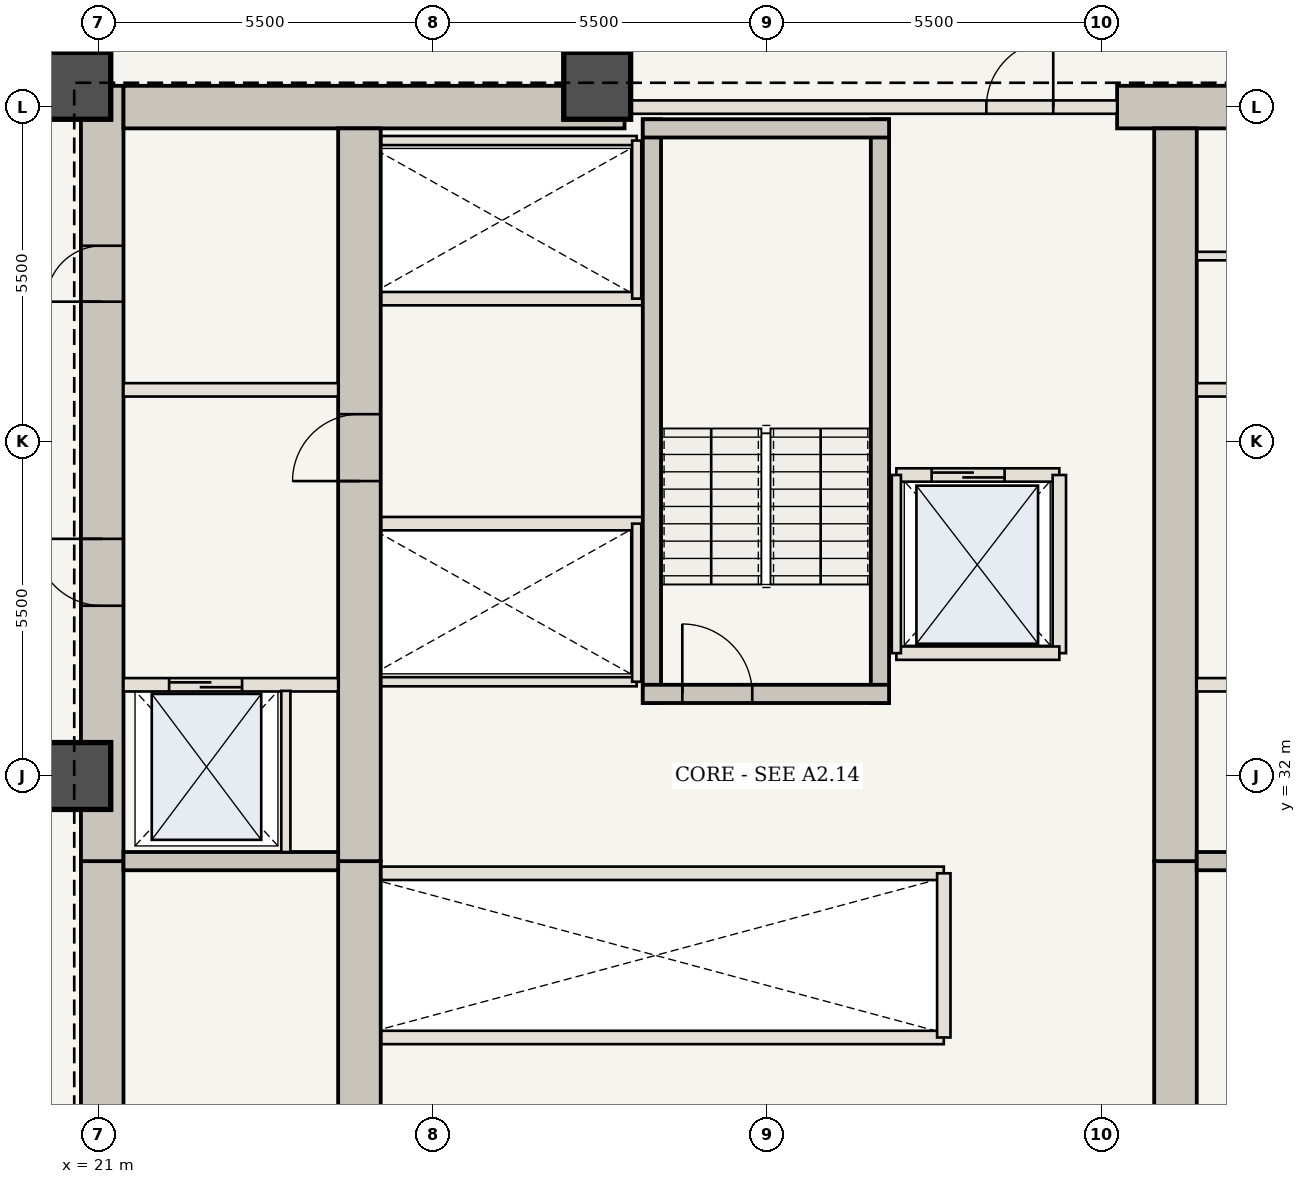
"""IFC4 building model, lengths in metres.
Left out: names, types, materials, properties, quantities, classifications, styles, units other than length and angle.
Written with IfcOpenShell. Run it as: python <this file> out.ifc"""

import sys

from ifc_helpers import new_model, si_unit, direction, frame, frame_2d, origin, origin_2d, place, context, subcontext, project, spatial, rectangle, extrude, element, fill, save


model = new_model("IFC4")
c1 = context("Model", 3, precision=1e-05, world=origin(), true_north=direction((0.0, 1.0)))
c2 = subcontext(c1, "Body", "Model", "MODEL_VIEW")
j1 = project(units=[si_unit("LENGTHUNIT", "METRE"), si_unit("PLANEANGLEUNIT", "RADIAN")], contexts=[c1])
p1 = place(None, origin())
s1 = spatial("IfcSite", under=j1, at=p1, CompositionType="ELEMENT")
p2 = place(p1, origin())
s2 = spatial("IfcBuilding", under=s1, at=p2, CompositionType="ELEMENT")
p3 = place(p2, frame((0.0, 0.0, 56.35)))
s3 = spatial("IfcBuildingStorey", under=s2, at=p3, CompositionType="ELEMENT", Elevation=56.35)
p4 = place(p3, frame((21.06, 20.6, 0.0), z_axis=(0.0, 0.0, 1.0), x_axis=(0.0, 1.0, 0.0)))
e1 = element("IfcWall", 1, at=p4, inside=s3, PredefinedType="SHEAR", context=c2, shape_type="SweptSolid", body=[
    extrude(rectangle(XDim=10.0, YDim=0.7, at=frame_2d((5.0, 0.0))), origin(), (0.0, 0.0, 1.0), 3.5),
])
p5 = place(p4, frame((1.15, 0.0, 0.0)))
e2 = element("IfcOpeningElement", 2, at=p5, cuts=e1, PredefinedType="OPENING", context=c2, shape_type="SweptSolid", body=[
    extrude(rectangle(XDim=1.15, YDim=2.15, at=frame_2d((0.575, 1.075))), frame((0.0, 0.36, 0.0), z_axis=(0.0, -1.0, 0.0), x_axis=(1.0, 0.0, 0.0)), (0.0, 0.0, 1.0), 0.72),
])
p6 = place(p3, frame((21.06, 30.6, 0.0), z_axis=(0.0, 0.0, 1.0), x_axis=(0.0, 1.0, 0.0)))
e3 = element("IfcWall", 3, at=p6, inside=s3, PredefinedType="SHEAR", context=c2, shape_type="SweptSolid", body=[
    extrude(rectangle(XDim=12.75, YDim=0.7, at=frame_2d((6.375, 0.0))), origin(), (0.0, 0.0, 1.0), 3.5),
])
p7 = place(p6, frame((4.2, 0.0, 0.0)))
e4 = element("IfcOpeningElement", 4, at=p7, cuts=e3, PredefinedType="OPENING", context=c2, shape_type="SweptSolid", body=[
    extrude(rectangle(XDim=1.1, YDim=2.15, at=frame_2d((0.55, 1.075))), frame((0.0, 0.36, 0.0), z_axis=(0.0, -1.0, 0.0), x_axis=(1.0, 0.0, 0.0)), (0.0, 0.0, 1.0), 0.72),
])
p8 = place(p6, frame((9.2, 0.0, 0.0)))
e5 = element("IfcOpeningElement", 5, at=p8, cuts=e3, PredefinedType="OPENING", context=c2, shape_type="SweptSolid", body=[
    extrude(rectangle(XDim=0.92, YDim=2.1, at=frame_2d((0.46, 1.05))), frame((0.0, 0.36, 0.0), z_axis=(0.0, -1.0, 0.0), x_axis=(1.0, 0.0, 0.0)), (0.0, 0.0, 1.0), 0.72),
])
p9 = place(p3, frame((21.41, 43.0, 0.0), z_axis=(0.0, 0.0, 1.0), x_axis=(1.0, 0.0, 0.0)))
e6 = element("IfcWall", 6, at=p9, inside=s3, PredefinedType="SHEAR", context=c2, shape_type="SweptSolid", body=[
    extrude(rectangle(XDim=8.24, YDim=0.7, at=frame_2d((4.12, 0.0))), origin(), (0.0, 0.0, 1.0), 3.5),
])
p10 = place(p3, frame((37.75, 43.0, 0.0), z_axis=(0.0, 0.0, 1.0), x_axis=(1.0, 0.0, 0.0)))
e7 = element("IfcWall", 7, at=p10, inside=s3, PredefinedType="SHEAR", context=c2, shape_type="SweptSolid", body=[
    extrude(rectangle(XDim=4.84, YDim=0.7, at=frame_2d((2.42, 0.0))), origin(), (0.0, 0.0, 1.0), 3.5),
])
p11 = place(p3, frame((25.29, 21.3, 0.0), z_axis=(0.0, 0.0, 1.0), x_axis=(0.0, 1.0, 0.0)))
e8 = element("IfcWall", 8, at=p11, inside=s3, PredefinedType="SHEAR", context=c2, shape_type="SweptSolid", body=[
    extrude(rectangle(XDim=9.3, YDim=0.7, at=frame_2d((4.65, 0.0))), origin(), (0.0, 0.0, 1.0), 3.5),
])
p12 = place(p3, frame((25.29, 30.6, 0.0), z_axis=(0.0, 0.0, 1.0), x_axis=(0.0, 1.0, 0.0)))
e9 = element("IfcWall", 9, at=p12, inside=s3, PredefinedType="SHEAR", context=c2, shape_type="SweptSolid", body=[
    extrude(rectangle(XDim=12.05, YDim=0.7, at=frame_2d((6.025, 0.0))), origin(), (0.0, 0.0, 1.0), 3.5),
])
p13 = place(p12, frame((6.25, 0.0, 0.0)))
e10 = element("IfcOpeningElement", 10, at=p13, cuts=e9, PredefinedType="OPENING", context=c2, shape_type="SweptSolid", body=[
    extrude(rectangle(XDim=1.1, YDim=2.15, at=frame_2d((0.55, 1.075))), frame((0.0, 0.36, 0.0), z_axis=(0.0, -1.0, 0.0), x_axis=(1.0, 0.0, 0.0)), (0.0, 0.0, 1.0), 0.72),
])
p14 = place(p3, frame((38.71, 21.3, 0.0), z_axis=(0.0, 0.0, 1.0), x_axis=(0.0, 1.0, 0.0)))
e11 = element("IfcWall", 11, at=p14, inside=s3, PredefinedType="SHEAR", context=c2, shape_type="SweptSolid", body=[
    extrude(rectangle(XDim=9.3, YDim=0.7, at=frame_2d((4.65, 0.0))), origin(), (0.0, 0.0, 1.0), 3.5),
])
p15 = place(p3, frame((38.71, 30.6, 0.0), z_axis=(0.0, 0.0, 1.0), x_axis=(0.0, 1.0, 0.0)))
e12 = element("IfcWall", 12, at=p15, inside=s3, PredefinedType="SHEAR", context=c2, shape_type="SweptSolid", body=[
    extrude(rectangle(XDim=12.05, YDim=0.7, at=frame_2d((6.025, 0.0))), origin(), (0.0, 0.0, 1.0), 3.5),
])
for number, where, z_axis, x_axis in (
    (13, (29.2, 43.35, 0.0), (0.0, 0.0, 1.0), (1.0, 0.0, 0.0)),
    (14, (20.65, 43.35, 0.0), (0.0, 0.0, 1.0), (1.0, 0.0, 0.0)),
    (15, (20.65, 32.0, 0.0), (0.0, 0.0, 1.0), (1.0, 0.0, 0.0)),
):
    element("IfcColumn", number, at=place(p3, frame(where, z_axis=z_axis, x_axis=x_axis)), inside=s3, PredefinedType="COLUMN", context=c2, shape_type="SweptSolid", body=[
        extrude(rectangle(XDim=1.1, YDim=1.1, at=origin_2d()), origin(), (0.0, 0.0, 1.0), 3.5),
    ])
for number, where, z_axis, x_axis in (
    (16, (21.41, 30.6, 0.0), (0.0, 0.0, 1.0), (1.0, 0.0, 0.0)),
    (17, (39.06, 30.6, 0.0), (0.0, 0.0, 1.0), (1.0, 0.0, 0.0)),
):
    element("IfcWall", number, at=place(p3, frame(where, z_axis=z_axis, x_axis=x_axis)), inside=s3, PredefinedType="SHEAR", context=c2, shape_type="SweptSolid", body=[
        extrude(rectangle(XDim=3.53, YDim=0.3, at=frame_2d((1.765, 0.0))), origin(), (0.0, 0.0, 1.0), 3.32),
    ])
p16 = place(p3, frame((21.41, 33.5, 0.0), z_axis=(0.0, 0.0, 1.0), x_axis=(1.0, 0.0, 0.0)))
e18 = element("IfcWall", 18, at=p16, inside=s3, PredefinedType="STANDARD", context=c2, shape_type="SweptSolid", body=[
    extrude(rectangle(XDim=3.53, YDim=0.22, at=frame_2d((1.765, 0.0))), origin(), (0.0, 0.0, 1.0), 3.32),
])
p17 = place(p16, frame((0.75, 0.0, 0.0)))
e19 = element("IfcOpeningElement", 19, at=p17, cuts=e18, PredefinedType="OPENING", context=c2, shape_type="SweptSolid", body=[
    extrude(rectangle(XDim=1.2, YDim=2.2, at=frame_2d((0.6, 1.1))), frame((0.0, 0.12, 0.0), z_axis=(0.0, -1.0, 0.0), x_axis=(1.0, 0.0, 0.0)), (0.0, 0.0, 1.0), 0.24),
])
p18 = place(p3, frame((24.08, 30.75, 0.0), z_axis=(0.0, 0.0, 1.0), x_axis=(0.0, 1.0, 0.0)))
e20 = element("IfcWall", 20, at=p18, inside=s3, PredefinedType="STANDARD", context=c2, shape_type="SweptSolid", body=[
    extrude(rectangle(XDim=2.65, YDim=0.15, at=frame_2d((1.325, 0.0))), origin(), (0.0, 0.0, 1.0), 3.32),
])
p19 = place(p3, frame((39.06, 33.5, 0.0), z_axis=(0.0, 0.0, 1.0), x_axis=(1.0, 0.0, 0.0)))
e21 = element("IfcWall", 21, at=p19, inside=s3, PredefinedType="STANDARD", context=c2, shape_type="SweptSolid", body=[
    extrude(rectangle(XDim=3.53, YDim=0.22, at=frame_2d((1.765, 0.0))), origin(), (0.0, 0.0, 1.0), 3.32),
])
p20 = place(p19, frame((1.55, 0.0, 0.0)))
e22 = element("IfcOpeningElement", 22, at=p20, cuts=e21, PredefinedType="OPENING", context=c2, shape_type="SweptSolid", body=[
    extrude(rectangle(XDim=1.2, YDim=2.2, at=frame_2d((0.6, 1.1))), frame((0.0, 0.12, 0.0), z_axis=(0.0, -1.0, 0.0), x_axis=(1.0, 0.0, 0.0)), (0.0, 0.0, 1.0), 0.24),
])
for number, where, z_axis, x_axis in (
    (23, (21.41, 38.35, 0.0), (0.0, 0.0, 1.0), (1.0, 0.0, 0.0)),
    (24, (39.06, 38.35, 0.0), (0.0, 0.0, 1.0), (1.0, 0.0, 0.0)),
):
    element("IfcWall", number, at=place(p3, frame(where, z_axis=z_axis, x_axis=x_axis)), inside=s3, PredefinedType="STANDARD", context=c2, shape_type="SweptSolid", body=[
        extrude(rectangle(XDim=3.53, YDim=0.22, at=frame_2d((1.765, 0.0))), origin(), (0.0, 0.0, 1.0), 3.32),
    ])
p21 = place(p3, frame((39.06, 40.55, 0.0), z_axis=(0.0, 0.0, 1.0), x_axis=(1.0, 0.0, 0.0)))
e25 = element("IfcWall", 25, at=p21, inside=s3, PredefinedType="STANDARD", context=c2, shape_type="SweptSolid", body=[
    extrude(rectangle(XDim=3.53, YDim=0.14, at=frame_2d((1.765, 0.0))), origin(), (0.0, 0.0, 1.0), 3.32),
])
for number, where, z_axis, x_axis in (
    (26, (25.65, 27.7, 0.0), (0.0, 0.0, 1.0), (1.0, 0.0, 0.0)),
    (27, (25.65, 30.4, 0.0), (0.0, 0.0, 1.0), (1.0, 0.0, 0.0)),
):
    element("IfcWall", number, at=place(p3, frame(where, z_axis=z_axis, x_axis=x_axis)), inside=s3, PredefinedType="STANDARD", context=c2, shape_type="SweptSolid", body=[
        extrude(rectangle(XDim=9.25, YDim=0.22, at=frame_2d((4.625, 0.0))), origin(), (0.0, 0.0, 1.0), 3.32),
    ])
p22 = place(p3, frame((34.9, 27.7, 0.0), z_axis=(0.0, 0.0, 1.0), x_axis=(0.0, 1.0, 0.0)))
e28 = element("IfcWall", 28, at=p22, inside=s3, PredefinedType="STANDARD", context=c2, shape_type="SweptSolid", body=[
    extrude(rectangle(XDim=2.7, YDim=0.22, at=frame_2d((1.35, 0.0))), origin(), (0.0, 0.0, 1.0), 3.32),
])
p23 = place(p3, frame((25.65, 36.15, 0.0), z_axis=(0.0, 0.0, 1.0), x_axis=(1.0, 0.0, 0.0)))
e29 = element("IfcWall", 29, at=p23, inside=s3, PredefinedType="STANDARD", context=c2, shape_type="SweptSolid", body=[
    extrude(rectangle(XDim=4.3, YDim=0.22, at=frame_2d((2.15, 0.0))), origin(), (0.0, 0.0, 1.0), 3.32),
])
p24 = place(p3, frame((25.65, 33.55, 0.0), z_axis=(0.0, 0.0, 1.0), x_axis=(1.0, 0.0, 0.0)))
e30 = element("IfcWall", 30, at=p24, inside=s3, PredefinedType="STANDARD", context=c2, shape_type="SweptSolid", body=[
    extrude(rectangle(XDim=4.2, YDim=0.15, at=frame_2d((2.1, 0.0))), origin(), (0.0, 0.0, 1.0), 3.32),
])
p25 = place(p3, frame((29.85, 33.55, 0.0), z_axis=(0.0, 0.0, 1.0), x_axis=(0.0, 1.0, 0.0)))
e31 = element("IfcWall", 31, at=p25, inside=s3, PredefinedType="STANDARD", context=c2, shape_type="SweptSolid", body=[
    extrude(rectangle(XDim=2.6, YDim=0.15, at=frame_2d((1.3, 0.0))), origin(), (0.0, 0.0, 1.0), 3.32),
])
p26 = place(p3, frame((25.65, 39.85, 0.0), z_axis=(0.0, 0.0, 1.0), x_axis=(1.0, 0.0, 0.0)))
e32 = element("IfcWall", 32, at=p26, inside=s3, PredefinedType="STANDARD", context=c2, shape_type="SweptSolid", body=[
    extrude(rectangle(XDim=4.3, YDim=0.22, at=frame_2d((2.15, 0.0))), origin(), (0.0, 0.0, 1.0), 3.32),
])
p27 = place(p3, frame((25.65, 42.45, 0.0), z_axis=(0.0, 0.0, 1.0), x_axis=(1.0, 0.0, 0.0)))
e33 = element("IfcWall", 33, at=p27, inside=s3, PredefinedType="STANDARD", context=c2, shape_type="SweptSolid", body=[
    extrude(rectangle(XDim=4.2, YDim=0.15, at=frame_2d((2.1, 0.0))), origin(), (0.0, 0.0, 1.0), 3.32),
])
p28 = place(p3, frame((29.85, 39.85, 0.0), z_axis=(0.0, 0.0, 1.0), x_axis=(0.0, 1.0, 0.0)))
e34 = element("IfcWall", 34, at=p28, inside=s3, PredefinedType="STANDARD", context=c2, shape_type="SweptSolid", body=[
    extrude(rectangle(XDim=2.6, YDim=0.15, at=frame_2d((1.3, 0.0))), origin(), (0.0, 0.0, 1.0), 3.32),
])
for number, where, z_axis, x_axis in (
    (35, (30.1, 33.2, 0.0), (0.0, 0.0, 1.0), (0.0, 1.0, 0.0)),
    (36, (33.85, 33.2, 0.0), (0.0, 0.0, 1.0), (0.0, 1.0, 0.0)),
):
    element("IfcWall", number, at=place(p3, frame(where, z_axis=z_axis, x_axis=x_axis)), inside=s3, PredefinedType="SHEAR", context=c2, shape_type="SweptSolid", body=[
        extrude(rectangle(XDim=9.6, YDim=0.3, at=frame_2d((4.8, 0.0))), origin(), (0.0, 0.0, 1.0), 3.32),
    ])
p29 = place(p3, frame((29.95, 33.35, 0.0), z_axis=(0.0, 0.0, 1.0), x_axis=(1.0, 0.0, 0.0)))
e37 = element("IfcWall", 37, at=p29, inside=s3, PredefinedType="SHEAR", context=c2, shape_type="SweptSolid", body=[
    extrude(rectangle(XDim=4.05, YDim=0.3, at=frame_2d((2.025, 0.0))), origin(), (0.0, 0.0, 1.0), 3.32),
])
p30 = place(p29, frame((0.65, 0.0, 0.0)))
e38 = element("IfcOpeningElement", 38, at=p30, cuts=e37, PredefinedType="OPENING", context=c2, shape_type="SweptSolid", body=[
    extrude(rectangle(XDim=1.15, YDim=2.15, at=frame_2d((0.575, 1.075))), frame((0.0, 0.16, 0.0), z_axis=(0.0, -1.0, 0.0), x_axis=(1.0, 0.0, 0.0)), (0.0, 0.0, 1.0), 0.32),
])
p31 = place(p3, frame((29.95, 42.65, 0.0), z_axis=(0.0, 0.0, 1.0), x_axis=(1.0, 0.0, 0.0)))
e39 = element("IfcWall", 39, at=p31, inside=s3, PredefinedType="SHEAR", context=c2, shape_type="SweptSolid", body=[
    extrude(rectangle(XDim=4.05, YDim=0.3, at=frame_2d((2.025, 0.0))), origin(), (0.0, 0.0, 1.0), 3.32),
])
p32 = place(p3, frame((29.65, 43.0, 0.0), z_axis=(0.0, 0.0, 1.0), x_axis=(1.0, 0.0, 0.0)))
e40 = element("IfcWall", 40, at=p32, inside=s3, PredefinedType="STANDARD", context=c2, shape_type="SweptSolid", body=[
    extrude(rectangle(XDim=8.1, YDim=0.22, at=frame_2d((4.05, 0.0))), origin(), (0.0, 0.0, 1.0), 3.32),
])
p33 = place(p32, frame((5.95, 0.0, 0.0)))
e41 = element("IfcOpeningElement", 41, at=p33, cuts=e40, PredefinedType="OPENING", context=c2, shape_type="SweptSolid", body=[
    extrude(rectangle(XDim=1.1, YDim=2.15, at=frame_2d((0.55, 1.075))), frame((0.0, 0.12, 0.0), z_axis=(0.0, -1.0, 0.0), x_axis=(1.0, 0.0, 0.0)), (0.0, 0.0, 1.0), 0.24),
])
p34 = place(p3, frame((34.12, 36.95, 0.0), z_axis=(0.0, 0.0, 1.0), x_axis=(1.0, 0.0, 0.0)))
e42 = element("IfcWall", 42, at=p34, inside=s3, PredefinedType="STANDARD", context=c2, shape_type="SweptSolid", body=[
    extrude(rectangle(XDim=2.68, YDim=0.22, at=frame_2d((1.34, 0.0))), origin(), (0.0, 0.0, 1.0), 3.32),
])
p35 = place(p34, frame((0.58, 0.0, 0.0)))
e43 = element("IfcOpeningElement", 43, at=p35, cuts=e42, PredefinedType="OPENING", context=c2, shape_type="SweptSolid", body=[
    extrude(rectangle(XDim=1.2, YDim=2.2, at=frame_2d((0.6, 1.1))), frame((0.0, 0.12, 0.0), z_axis=(0.0, -1.0, 0.0), x_axis=(1.0, 0.0, 0.0)), (0.0, 0.0, 1.0), 0.24),
])
p36 = place(p3, frame((36.8, 34.02, 0.0), z_axis=(0.0, 0.0, 1.0), x_axis=(0.0, 1.0, 0.0)))
e44 = element("IfcWall", 44, at=p36, inside=s3, PredefinedType="STANDARD", context=c2, shape_type="SweptSolid", body=[
    extrude(rectangle(XDim=2.93, YDim=0.22, at=frame_2d((1.465, 0.0))), origin(), (0.0, 0.0, 1.0), 3.32),
])
p37 = place(p3, frame((34.12, 34.02, 0.0), z_axis=(0.0, 0.0, 1.0), x_axis=(1.0, 0.0, 0.0)))
e45 = element("IfcWall", 45, at=p37, inside=s3, PredefinedType="STANDARD", context=c2, shape_type="SweptSolid", body=[
    extrude(rectangle(XDim=2.68, YDim=0.22, at=frame_2d((1.34, 0.0))), origin(), (0.0, 0.0, 1.0), 3.32),
])
p38 = place(p3, frame((34.12, 34.02, 0.0), z_axis=(0.0, 0.0, 1.0), x_axis=(0.0, 1.0, 0.0)))
e46 = element("IfcWall", 46, at=p38, inside=s3, PredefinedType="STANDARD", context=c2, shape_type="SweptSolid", body=[
    extrude(rectangle(XDim=2.93, YDim=0.15, at=frame_2d((1.465, 0.0))), origin(), (0.0, 0.0, 1.0), 3.32),
])
p39 = place(p7, origin())
e47 = element("IfcDoor", 47, at=p39, inside=s3, OperationType="SINGLE_SWING_RIGHT", PredefinedType="DOOR", context=c2, shape_type="SweptSolid", body=[
    extrude(rectangle(XDim=1.1, YDim=2.15, at=frame_2d((0.55, 1.075))), frame((0.0, 0.025, 0.0), z_axis=(0.0, -1.0, 0.0), x_axis=(1.0, 0.0, 0.0)), (0.0, 0.0, 1.0), 0.05),
])
fill(e4, e47)
p40 = place(p13, origin())
e48 = element("IfcDoor", 48, at=p40, inside=s3, OperationType="SINGLE_SWING_LEFT", PredefinedType="DOOR", context=c2, shape_type="SweptSolid", body=[
    extrude(rectangle(XDim=1.1, YDim=2.15, at=frame_2d((0.55, 1.075))), frame((0.0, 0.025, 0.0), z_axis=(0.0, -1.0, 0.0), x_axis=(1.0, 0.0, 0.0)), (0.0, 0.0, 1.0), 0.05),
])
fill(e10, e48)
p41 = place(p8, origin())
e49 = element("IfcDoor", 49, at=p41, inside=s3, OperationType="SINGLE_SWING_LEFT", PredefinedType="DOOR", context=c2, shape_type="SweptSolid", body=[
    extrude(rectangle(XDim=0.92, YDim=2.1, at=frame_2d((0.46, 1.05))), frame((0.0, 0.025, 0.0), z_axis=(0.0, -1.0, 0.0), x_axis=(1.0, 0.0, 0.0)), (0.0, 0.0, 1.0), 0.05),
])
fill(e5, e49)
p42 = place(p17, origin())
e50 = element("IfcDoor", 50, at=p42, inside=s3, OperationType="DOUBLE_DOOR_SLIDING", PredefinedType="DOOR", context=c2, shape_type="SweptSolid", body=[
    extrude(rectangle(XDim=1.2, YDim=2.2, at=frame_2d((0.6, 1.1))), frame((0.0, 0.025, 0.0), z_axis=(0.0, -1.0, 0.0), x_axis=(1.0, 0.0, 0.0)), (0.0, 0.0, 1.0), 0.05),
])
fill(e19, e50)
p43 = place(p30, origin())
e51 = element("IfcDoor", 51, at=p43, inside=s3, OperationType="SINGLE_SWING_LEFT", PredefinedType="DOOR", context=c2, shape_type="SweptSolid", body=[
    extrude(rectangle(XDim=1.15, YDim=2.15, at=frame_2d((0.575, 1.075))), frame((0.0, 0.025, 0.0), z_axis=(0.0, -1.0, 0.0), x_axis=(1.0, 0.0, 0.0)), (0.0, 0.0, 1.0), 0.05),
])
fill(e38, e51)
p44 = place(p33, origin())
e52 = element("IfcDoor", 52, at=p44, inside=s3, OperationType="SINGLE_SWING_RIGHT", PredefinedType="DOOR", context=c2, shape_type="SweptSolid", body=[
    extrude(rectangle(XDim=1.1, YDim=2.15, at=frame_2d((0.55, 1.075))), frame((0.0, 0.025, 0.0), z_axis=(0.0, -1.0, 0.0), x_axis=(1.0, 0.0, 0.0)), (0.0, 0.0, 1.0), 0.05),
])
fill(e41, e52)
p45 = place(p35, origin())
e53 = element("IfcDoor", 53, at=p45, inside=s3, OperationType="DOUBLE_DOOR_SLIDING", PredefinedType="DOOR", context=c2, shape_type="SweptSolid", body=[
    extrude(rectangle(XDim=1.2, YDim=2.2, at=frame_2d((0.6, 1.1))), frame((0.0, 0.025, 0.0), z_axis=(0.0, -1.0, 0.0), x_axis=(1.0, 0.0, 0.0)), (0.0, 0.0, 1.0), 0.05),
])
fill(e43, e53)
save(model, sys.argv[1])
